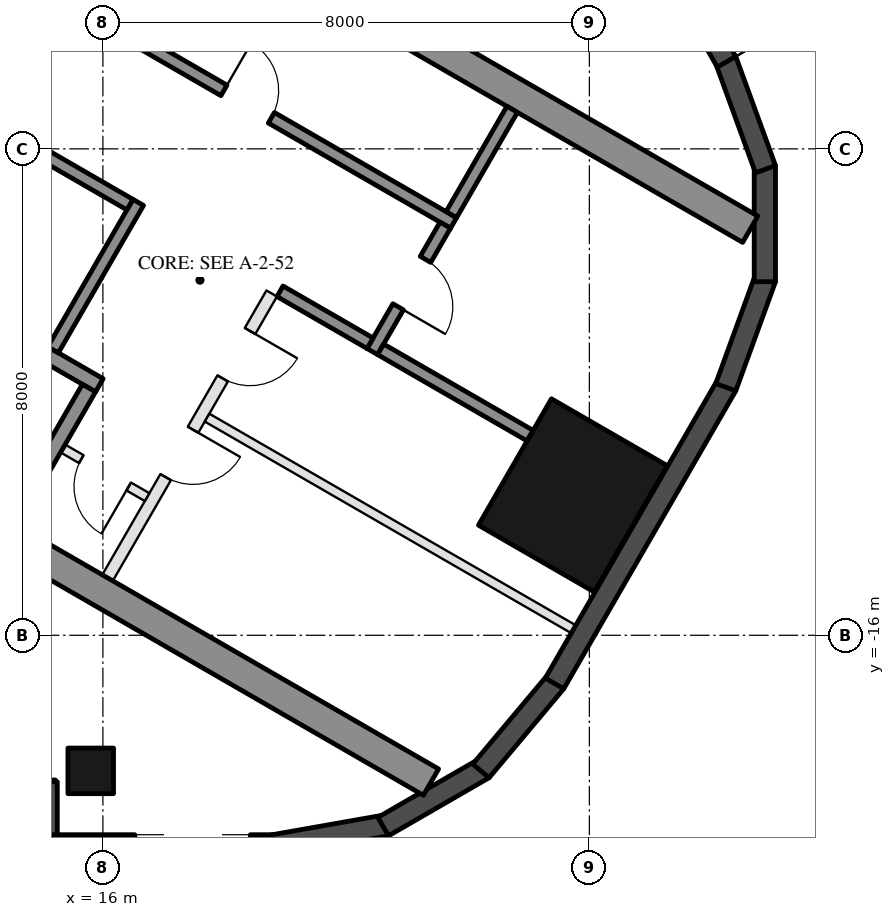
"""IFC4 building model, lengths in metres.
Left out: names, types, materials, properties, quantities, classifications, styles, units other than length and angle.
Written with IfcOpenShell. Run it as: python <this file> out.ifc"""

import sys

from ifc_helpers import new_model, si_unit, direction, frame, frame_2d, origin, origin_2d, place, context, subcontext, project, spatial, rectangle, hollow_rectangle, extrude, element, fill, save


model = new_model("IFC4")
c1 = context("Model", 3, precision=1e-05, world=origin(), true_north=direction((0.0, 1.0)))
c2 = subcontext(c1, "Body", "Model", "MODEL_VIEW")
j1 = project(units=[si_unit("LENGTHUNIT", "METRE"), si_unit("PLANEANGLEUNIT", "RADIAN")], contexts=[c1])
p1 = place(None, origin())
s1 = spatial("IfcSite", under=j1, at=p1, CompositionType="ELEMENT")
p2 = place(p1, origin())
s2 = spatial("IfcBuilding", under=s1, at=p2, CompositionType="ELEMENT")
p3 = place(p2, frame((0.0, 0.0, 224.3)))
s3 = spatial("IfcBuildingStorey", under=s2, at=p3, CompositionType="ELEMENT", Elevation=224.3)
p4 = place(p3, frame((15.8, -18.23, 0.0), z_axis=(0.0, 0.0, 1.0), x_axis=(-1.0, 0.0, 0.0)))
e1 = element("IfcColumn", 1, at=p4, inside=s3, PredefinedType="COLUMN", context=c2, shape_type="SweptSolid", body=[
    extrude(hollow_rectangle(XDim=0.75, YDim=0.75, WallThickness=0.035, at=origin_2d()), origin(), (0.0, 0.0, 1.0), 3.7),
])
p5 = place(p3, frame((23.729, -13.7, 0.0), z_axis=(0.0, 0.0, 1.0), x_axis=(0.5, 0.866025403784, 0.0)))
e2 = element("IfcColumn", 2, at=p5, inside=s3, PredefinedType="COLUMN", context=c2, shape_type="SweptSolid", body=[
    extrude(hollow_rectangle(XDim=2.4, YDim=2.2, WallThickness=0.06, at=origin_2d()), origin(), (0.0, 0.0, 1.0), 3.7),
])
p6 = place(p3, frame((8.48, -18.555, 0.0), z_axis=(0.0, 0.0, 1.0), x_axis=(1.0, 0.0, 0.0)))
e3 = element("IfcWall", 3, at=p6, inside=s3, PredefinedType="SOLIDWALL", context=c2, shape_type="SweptSolid", body=[
    extrude(rectangle(XDim=6.74, YDim=0.35, at=frame_2d((3.37, 0.0))), origin(), (0.0, 0.0, 1.0), 3.55),
])
p7 = place(p6, frame((0.32, 0.0, 0.0)))
e4 = element("IfcOpeningElement", 4, at=p7, cuts=e3, PredefinedType="OPENING", context=c2, shape_type="SweptSolid", body=[
    extrude(rectangle(XDim=2.4, YDim=2.4, at=frame_2d((1.2, 1.2))), frame((0.0, 0.185, 0.0), z_axis=(0.0, -1.0, 0.0), x_axis=(1.0, 0.0, 0.0)), (0.0, 0.0, 1.0), 0.37),
])
p8 = place(p6, frame((3.02, 0.0, 0.3)))
e5 = element("IfcOpeningElement", 5, at=p8, cuts=e3, PredefinedType="OPENING", context=c2, shape_type="SweptSolid", body=[
    extrude(rectangle(XDim=2.9, YDim=2.65, at=frame_2d((1.45, 1.325))), frame((0.0, 0.185, 0.0), z_axis=(0.0, -1.0, 0.0), x_axis=(1.0, 0.0, 0.0)), (0.0, 0.0, 1.0), 0.37),
])
p9 = place(p3, frame((15.075, -18.41, 0.0), z_axis=(0.0, 0.0, 1.0), x_axis=(0.0, -1.0, 0.0)))
e6 = element("IfcWall", 6, at=p9, inside=s3, PredefinedType="SOLIDWALL", context=c2, shape_type="SweptSolid", body=[
    extrude(rectangle(XDim=1.22, YDim=0.35, at=frame_2d((0.61, 0.0))), origin(), (0.0, 0.0, 1.0), 3.55),
])
p10 = place(p3, frame((14.9, -19.455, 0.0), z_axis=(0.0, 0.0, 1.0), x_axis=(1.0, 0.0, 0.0)))
e7 = element("IfcWall", 7, at=p10, inside=s3, PredefinedType="SOLIDWALL", context=c2, shape_type="SweptSolid", body=[
    extrude(rectangle(XDim=3.916, YDim=0.35, at=frame_2d((1.958, 0.0))), origin(), (0.0, 0.0, 1.0), 3.55),
])
p11 = place(p10, frame((1.625, 0.0, 0.3)))
e8 = element("IfcOpeningElement", 8, at=p11, cuts=e7, PredefinedType="OPENING", context=c2, shape_type="SweptSolid", body=[
    extrude(rectangle(XDim=1.9, YDim=2.65, at=frame_2d((0.95, 1.325))), frame((0.0, 0.185, 0.0), z_axis=(0.0, -1.0, 0.0), x_axis=(1.0, 0.0, 0.0)), (0.0, 0.0, 1.0), 0.37),
])
p12 = place(p3, frame((18.785, -19.458, 0.0), z_axis=(0.0, 0.0, 1.0), x_axis=(0.984798995425, 0.173697837091, 0.0)))
e9 = element("IfcWall", 9, at=p12, inside=s3, PredefinedType="SOLIDWALL", context=c2, shape_type="SweptSolid", body=[
    extrude(rectangle(XDim=1.91, YDim=0.35, at=frame_2d((0.955, 0.0))), origin(), (0.0, 0.0, 1.0), 3.55),
])
for number, where, z_axis, x_axis in (
    (10, (20.61, -19.147, 0.0), (0.0, 0.0, 1.0), (0.866, 0.5, 0.0)),
    (11, (22.217, -18.231, 0.0), (0.0, 0.0, 1.0), (0.643, 0.766, 0.0)),
):
    element("IfcWall", number, at=place(p3, frame(where, z_axis=z_axis, x_axis=x_axis)), inside=s3, PredefinedType="SOLIDWALL", context=c2, shape_type="SweptSolid", body=[
        extrude(rectangle(XDim=1.91, YDim=0.35, at=frame_2d((0.955, 0.0))), origin(), (0.0, 0.0, 1.0), 3.55),
    ])
p13 = place(p3, frame((23.427, -16.792, 0.0), z_axis=(0.0, 0.0, 1.0), x_axis=(0.500018773155, 0.866014564827, 0.0)))
e12 = element("IfcWall", 12, at=p13, inside=s3, PredefinedType="SOLIDWALL", context=c2, shape_type="SweptSolid", body=[
    extrude(rectangle(XDim=5.658, YDim=0.35, at=frame_2d((2.829, 0.0))), origin(), (0.0, 0.0, 1.0), 3.55),
])
for number, where, z_axis, x_axis in (
    (13, (26.244, -11.92, 0.0), (0.0, 0.0, 1.0), (0.342, 0.94, 0.0)),
    (14, (26.886, -10.185, 0.0), (0.0, 0.0, 1.0), (0.0, 1.0, 0.0)),
    (15, (26.897, -8.335, 0.0), (0.0, 0.0, 1.0), (-0.342, 0.94, 0.0)),
):
    element("IfcWall", number, at=place(p3, frame(where, z_axis=z_axis, x_axis=x_axis)), inside=s3, PredefinedType="SOLIDWALL", context=c2, shape_type="SweptSolid", body=[
        extrude(rectangle(XDim=1.91, YDim=0.35, at=frame_2d((0.955, 0.0))), origin(), (0.0, 0.0, 1.0), 3.55),
    ])
p14 = place(p3, frame((26.257, -6.567, 0.0), z_axis=(0.0, 0.0, 1.0), x_axis=(-0.500023526245, 0.866011820475, 0.0)))
e16 = element("IfcWall", 16, at=p14, inside=s3, PredefinedType="SOLIDWALL", context=c2, shape_type="SweptSolid", body=[
    extrude(rectangle(XDim=11.816, YDim=0.35, at=frame_2d((5.908, 0.0))), origin(), (0.0, 0.0, 1.0), 3.55),
])
p15 = place(p14, frame((0.38, 0.0, 0.3)))
e17 = element("IfcOpeningElement", 17, at=p15, cuts=e16, PredefinedType="OPENING", context=c2, shape_type="SweptSolid", body=[
    extrude(rectangle(XDim=1.9, YDim=2.65, at=frame_2d((0.95, 1.325))), frame((0.0, 0.185, 0.0), z_axis=(0.0, -1.0, 0.0), x_axis=(1.0, 0.0, 0.0)), (0.0, 0.0, 1.0), 0.37),
])
p16 = place(p14, frame((7.791, 0.0, 0.0)))
e18 = element("IfcOpeningElement", 18, at=p16, cuts=e16, PredefinedType="OPENING", context=c2, shape_type="SweptSolid", body=[
    extrude(rectangle(XDim=2.4, YDim=2.4, at=frame_2d((1.2, 1.2))), frame((0.0, 0.185, 0.0), z_axis=(0.0, -1.0, 0.0), x_axis=(1.0, 0.0, 0.0)), (0.0, 0.0, 1.0), 0.37),
])
p17 = place(p14, frame((3.741, 0.0, 0.3)))
e19 = element("IfcOpeningElement", 19, at=p17, cuts=e16, PredefinedType="OPENING", context=c2, shape_type="SweptSolid", body=[
    extrude(rectangle(XDim=1.7, YDim=2.65, at=frame_2d((0.85, 1.325))), frame((0.0, 0.185, 0.0), z_axis=(0.0, -1.0, 0.0), x_axis=(1.0, 0.0, 0.0)), (0.0, 0.0, 1.0), 0.37),
])
p18 = place(p14, frame((5.741, 0.0, 0.3)))
e20 = element("IfcOpeningElement", 20, at=p18, cuts=e16, PredefinedType="OPENING", context=c2, shape_type="SweptSolid", body=[
    extrude(rectangle(XDim=1.7, YDim=2.65, at=frame_2d((0.85, 1.325))), frame((0.0, 0.185, 0.0), z_axis=(0.0, -1.0, 0.0), x_axis=(1.0, 0.0, 0.0)), (0.0, 0.0, 1.0), 0.37),
])
for number, where, z_axis, x_axis in (
    (21, (8.547, -10.997, 0.0), (0.0, 0.0, 1.0), (0.866, -0.5, 0.0)),
    (22, (13.797, -1.903, 0.0), (0.0, 0.0, 1.0), (0.866, -0.5, 0.0)),
):
    element("IfcWall", number, at=place(p3, frame(where, z_axis=z_axis, x_axis=x_axis)), inside=s3, PredefinedType="SHEAR", context=c2, shape_type="SweptSolid", body=[
        extrude(rectangle(XDim=14.837, YDim=0.5, at=frame_2d((7.418, 0.0))), origin(), (0.0, 0.0, 1.0), 3.5),
    ])
p19 = place(p3, frame((10.356, -8.664, 0.0), z_axis=(0.0, 0.0, 1.0), x_axis=(0.866028629588, -0.499994412703, 0.0)))
e23 = element("IfcWall", 23, at=p19, inside=s3, PredefinedType="SHEAR", context=c2, shape_type="SweptSolid", body=[
    extrude(rectangle(XDim=6.45, YDim=0.25, at=frame_2d((3.225, 0.0))), origin(), (0.0, 0.0, 1.0), 3.5),
])
p20 = place(p19, frame((0.3, 0.0, 0.0)))
e24 = element("IfcOpeningElement", 24, at=p20, cuts=e23, PredefinedType="OPENING", context=c2, shape_type="SweptSolid", body=[
    extrude(rectangle(XDim=1.0, YDim=2.1, at=frame_2d((0.5, 1.05))), frame((0.0, 0.135, 0.0), z_axis=(0.0, -1.0, 0.0), x_axis=(1.0, 0.0, 0.0)), (0.0, 0.0, 1.0), 0.27),
])
p21 = place(p3, frame((14.496, -14.143, 0.0), z_axis=(0.0, 0.0, 1.0), x_axis=(0.500062241894, 0.865989465428, 0.0)))
e25 = element("IfcWall", 25, at=p21, inside=s3, PredefinedType="SHEAR", context=c2, shape_type="SweptSolid", body=[
    extrude(rectangle(XDim=2.55, YDim=0.25, at=frame_2d((1.275, 0.0))), origin(), (0.0, 0.0, 1.0), 3.5),
])
p22 = place(p3, frame((15.181, -11.305, 0.0), z_axis=(0.0, 0.0, 1.0), x_axis=(0.49994636267, 0.866056369097, 0.0)))
e26 = element("IfcWall", 26, at=p22, inside=s3, PredefinedType="SHEAR", context=c2, shape_type="SweptSolid", body=[
    extrude(rectangle(XDim=2.8, YDim=0.2, at=frame_2d((1.4, 0.0))), origin(), (0.0, 0.0, 1.0), 3.5),
])
p23 = place(p3, frame((14.02, -7.517, 0.0), z_axis=(0.0, 0.0, 1.0), x_axis=(0.866034573852, -0.49998411664, 0.0)))
e27 = element("IfcWall", 27, at=p23, inside=s3, PredefinedType="SHEAR", context=c2, shape_type="SweptSolid", body=[
    extrude(rectangle(XDim=2.8, YDim=0.2, at=frame_2d((1.4, 0.0))), origin(), (0.0, 0.0, 1.0), 3.5),
])
p24 = place(p3, frame((12.968, -4.138, 0.0), z_axis=(0.0, 0.0, 1.0), x_axis=(0.866028328073, -0.49999493495, 0.0)))
e28 = element("IfcWall", 28, at=p24, inside=s3, PredefinedType="SHEAR", context=c2, shape_type="SweptSolid", body=[
    extrude(rectangle(XDim=10.16, YDim=0.2, at=frame_2d((5.08, 0.0))), origin(), (0.0, 0.0, 1.0), 3.5),
])
p25 = place(p24, frame((0.72, 0.0, 0.0)))
e29 = element("IfcOpeningElement", 29, at=p25, cuts=e28, PredefinedType="OPENING", context=c2, shape_type="SweptSolid", body=[
    extrude(rectangle(XDim=0.9, YDim=2.1, at=frame_2d((0.45, 1.05))), frame((0.0, 0.11, 0.0), z_axis=(0.0, -1.0, 0.0), x_axis=(1.0, 0.0, 0.0)), (0.0, 0.0, 1.0), 0.22),
])
p26 = place(p24, frame((5.8, 0.0, 0.0)))
e30 = element("IfcOpeningElement", 30, at=p26, cuts=e28, PredefinedType="OPENING", context=c2, shape_type="SweptSolid", body=[
    extrude(rectangle(XDim=0.9, YDim=2.1, at=frame_2d((0.45, 1.05))), frame((0.0, 0.11, 0.0), z_axis=(0.0, -1.0, 0.0), x_axis=(1.0, 0.0, 0.0)), (0.0, 0.0, 1.0), 0.22),
])
p27 = place(p3, frame((20.43, -11.333, 0.0), z_axis=(0.0, 0.0, 1.0), x_axis=(0.500001309137, 0.866024647952, 0.0)))
e31 = element("IfcWall", 31, at=p27, inside=s3, PredefinedType="SHEAR", context=c2, shape_type="SweptSolid", body=[
    extrude(rectangle(XDim=2.4, YDim=0.2, at=frame_2d((1.2, 0.0))), origin(), (0.0, 0.0, 1.0), 3.5),
])
p28 = place(p27, frame((0.85, 0.0, 0.0)))
e32 = element("IfcOpeningElement", 32, at=p28, cuts=e31, PredefinedType="OPENING", context=c2, shape_type="SweptSolid", body=[
    extrude(rectangle(XDim=0.9, YDim=2.1, at=frame_2d((0.45, 1.05))), frame((0.0, 0.11, 0.0), z_axis=(0.0, -1.0, 0.0), x_axis=(1.0, 0.0, 0.0)), (0.0, 0.0, 1.0), 0.22),
])
p29 = place(p3, frame((18.913, -10.342, 0.0), z_axis=(0.0, 0.0, 1.0), x_axis=(0.866038183914, -0.499977863513, 0.0)))
e33 = element("IfcWall", 33, at=p29, inside=s3, PredefinedType="SHEAR", context=c2, shape_type="SweptSolid", body=[
    extrude(rectangle(XDim=1.71, YDim=0.2, at=frame_2d((0.855, 0.0))), origin(), (0.0, 0.0, 1.0), 3.5),
])
p30 = place(p3, frame((21.73, -9.082, 0.0), z_axis=(0.0, 0.0, 1.0), x_axis=(0.50002537861, 0.866010750942, 0.0)))
e34 = element("IfcWall", 34, at=p30, inside=s3, PredefinedType="SHEAR", context=c2, shape_type="SweptSolid", body=[
    extrude(rectangle(XDim=2.0, YDim=0.2, at=frame_2d((1.0, 0.0))), origin(), (0.0, 0.0, 1.0), 3.5),
])
p31 = place(p3, frame((20.567, -11.297, 0.0), z_axis=(0.0, 0.0, 1.0), x_axis=(0.866055327414, -0.49994816717, 0.0)))
e35 = element("IfcWall", 35, at=p31, inside=s3, PredefinedType="SHEAR", context=c2, shape_type="SweptSolid", body=[
    extrude(rectangle(XDim=2.84, YDim=0.2, at=frame_2d((1.42, 0.0))), origin(), (0.0, 0.0, 1.0), 3.5),
])
p32 = place(p3, frame((16.076, -15.055, 0.0), z_axis=(0.0, 0.0, 1.0), x_axis=(0.499995103361, 0.866028230842, 0.0)))
e36 = element("IfcWall", 36, at=p32, inside=s3, PredefinedType="PARTITIONING", context=c2, shape_type="SweptSolid", body=[
    extrude(rectangle(XDim=5.4, YDim=0.2, at=frame_2d((2.7, 0.0))), origin(), (0.0, 0.0, 1.0), 3.5),
])
p33 = place(p32, frame((1.913, 0.0, 0.0)))
e37 = element("IfcOpeningElement", 37, at=p33, cuts=e36, PredefinedType="OPENING", context=c2, shape_type="SweptSolid", body=[
    extrude(rectangle(XDim=0.9, YDim=2.1, at=frame_2d((0.45, 1.05))), frame((0.0, 0.11, 0.0), z_axis=(0.0, -1.0, 0.0), x_axis=(1.0, 0.0, 0.0)), (0.0, 0.0, 1.0), 0.22),
])
p34 = place(p32, frame((3.788, 0.0, 0.0)))
e38 = element("IfcOpeningElement", 38, at=p34, cuts=e36, PredefinedType="OPENING", context=c2, shape_type="SweptSolid", body=[
    extrude(rectangle(XDim=0.9, YDim=2.1, at=frame_2d((0.45, 1.05))), frame((0.0, 0.11, 0.0), z_axis=(0.0, -1.0, 0.0), x_axis=(1.0, 0.0, 0.0)), (0.0, 0.0, 1.0), 0.22),
])
p35 = place(p3, frame((15.342, -12.928, 0.0), z_axis=(0.0, 0.0, 1.0), x_axis=(0.865989903783, -0.500061482766, 0.0)))
e39 = element("IfcWall", 39, at=p35, inside=s3, PredefinedType="PARTITIONING", context=c2, shape_type="SweptSolid", body=[
    extrude(rectangle(XDim=1.6, YDim=0.15, at=frame_2d((0.8, 0.0))), origin(), (0.0, 0.0, 1.0), 3.5),
])
p36 = place(p35, frame((0.35, 0.0, 0.0)))
e40 = element("IfcOpeningElement", 40, at=p36, cuts=e39, PredefinedType="OPENING", context=c2, shape_type="SweptSolid", body=[
    extrude(rectangle(XDim=0.9, YDim=2.1, at=frame_2d((0.45, 1.05))), frame((0.0, 0.085, 0.0), z_axis=(0.0, -1.0, 0.0), x_axis=(1.0, 0.0, 0.0)), (0.0, 0.0, 1.0), 0.17),
])
p37 = place(p3, frame((17.713, -12.42, 0.0), z_axis=(0.0, 0.0, 1.0), x_axis=(0.866016523273, -0.500015381182, 0.0)))
e41 = element("IfcWall", 41, at=p37, inside=s3, PredefinedType="PARTITIONING", context=c2, shape_type="SweptSolid", body=[
    extrude(rectangle(XDim=6.95, YDim=0.15, at=frame_2d((3.475, 0.0))), origin(), (0.0, 0.0, 1.0), 3.5),
])
p38 = place(p36, frame((0.9, 0.0, 0.0), z_axis=(0.0, 0.0, 1.0), x_axis=(-1.0, 0.0, 0.0)))
e42 = element("IfcDoor", 42, at=p38, inside=s3, OperationType="SINGLE_SWING_LEFT", PredefinedType="DOOR", context=c2, shape_type="SweptSolid", body=[
    extrude(rectangle(XDim=0.9, YDim=2.1, at=frame_2d((0.45, 1.05))), frame((0.0, 0.025, 0.0), z_axis=(0.0, -1.0, 0.0), x_axis=(1.0, 0.0, 0.0)), (0.0, 0.0, 1.0), 0.05),
])
fill(e40, e42)
p39 = place(p26, origin())
e43 = element("IfcDoor", 43, at=p39, inside=s3, OperationType="SINGLE_SWING_LEFT", PredefinedType="DOOR", context=c2, shape_type="SweptSolid", body=[
    extrude(rectangle(XDim=0.9, YDim=2.1, at=frame_2d((0.45, 1.05))), frame((0.0, 0.025, 0.0), z_axis=(0.0, -1.0, 0.0), x_axis=(1.0, 0.0, 0.0)), (0.0, 0.0, 1.0), 0.05),
])
fill(e30, e43)
p40 = place(p28, frame((0.9, 0.0, 0.0), z_axis=(0.0, 0.0, 1.0), x_axis=(-1.0, 0.0, 0.0)))
e44 = element("IfcDoor", 44, at=p40, inside=s3, OperationType="SINGLE_SWING_RIGHT", PredefinedType="DOOR", context=c2, shape_type="SweptSolid", body=[
    extrude(rectangle(XDim=0.9, YDim=2.1, at=frame_2d((0.45, 1.05))), frame((0.0, 0.025, 0.0), z_axis=(0.0, -1.0, 0.0), x_axis=(1.0, 0.0, 0.0)), (0.0, 0.0, 1.0), 0.05),
])
fill(e32, e44)
p41 = place(p33, frame((0.9, 0.0, 0.0), z_axis=(0.0, 0.0, 1.0), x_axis=(-1.0, 0.0, 0.0)))
e45 = element("IfcDoor", 45, at=p41, inside=s3, OperationType="SINGLE_SWING_LEFT", PredefinedType="DOOR", context=c2, shape_type="SweptSolid", body=[
    extrude(rectangle(XDim=0.9, YDim=2.1, at=frame_2d((0.45, 1.05))), frame((0.0, 0.025, 0.0), z_axis=(0.0, -1.0, 0.0), x_axis=(1.0, 0.0, 0.0)), (0.0, 0.0, 1.0), 0.05),
])
fill(e37, e45)
p42 = place(p34, frame((0.9, 0.0, 0.0), z_axis=(0.0, 0.0, 1.0), x_axis=(-1.0, 0.0, 0.0)))
e46 = element("IfcDoor", 46, at=p42, inside=s3, OperationType="SINGLE_SWING_LEFT", PredefinedType="DOOR", context=c2, shape_type="SweptSolid", body=[
    extrude(rectangle(XDim=0.9, YDim=2.1, at=frame_2d((0.45, 1.05))), frame((0.0, 0.025, 0.0), z_axis=(0.0, -1.0, 0.0), x_axis=(1.0, 0.0, 0.0)), (0.0, 0.0, 1.0), 0.05),
])
fill(e38, e46)
save(model, sys.argv[1])
